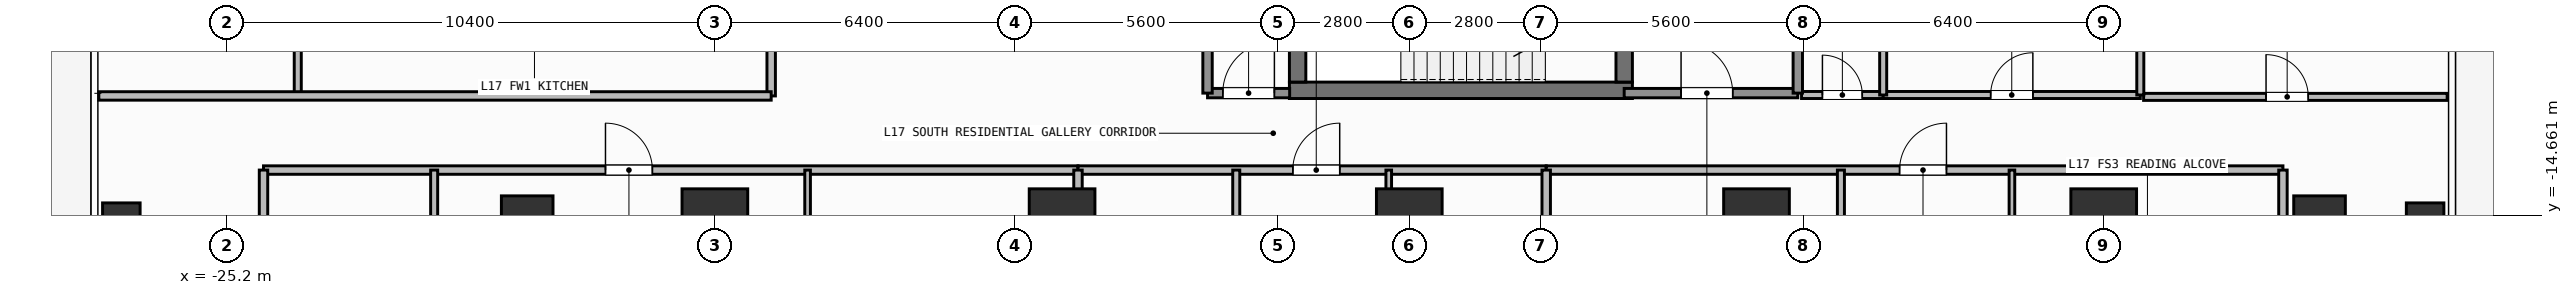
"""IFC4 building model, lengths in metres.
Left out: names, types, materials, properties, quantities, classifications, styles, units other than length and angle.
Written with IfcOpenShell. Run it as: python <this file> out.ifc"""

import sys

from ifc_helpers import new_model, si_unit, direction, frame, frame_2d, origin, origin_2d, place, context, subcontext, project, spatial, rectangle, hollow_rectangle, extrude, element, fill, save


model = new_model("IFC4")
c1 = context("Model", 3, precision=1e-05, world=origin(), true_north=direction((0.0, 1.0)))
c2 = subcontext(c1, "Body", "Model", "MODEL_VIEW")
j1 = project(units=[si_unit("LENGTHUNIT", "METRE"), si_unit("PLANEANGLEUNIT", "RADIAN")], contexts=[c1])
p1 = place(None, origin())
s1 = spatial("IfcSite", under=j1, at=p1, CompositionType="ELEMENT")
p2 = place(p1, origin())
s2 = spatial("IfcBuilding", under=s1, at=p2, CompositionType="ELEMENT")
p3 = place(p2, frame((0.0, 0.0, 65.7)))
s3 = spatial("IfcBuildingStorey", under=s2, at=p3, CompositionType="ELEMENT", Elevation=65.7)
p4 = place(p3, frame((-2.555, -12.0, 0.0), z_axis=(0.0, 0.0, 1.0), x_axis=(1.0, 0.0, 0.0)))
e1 = element("IfcWall", 1, at=p4, inside=s3, PredefinedType="SHEAR", context=c2, shape_type="SweptSolid", body=[
    extrude(rectangle(XDim=7.31, YDim=0.35, at=frame_2d((3.655, 0.0))), origin(), (0.0, 0.0, 1.0), 3.9),
])
p5 = place(p3, frame((-2.38, -11.825, 0.0), z_axis=(0.0, 0.0, 1.0), x_axis=(0.0, 1.0, 0.0)))
e2 = element("IfcWall", 2, at=p5, inside=s3, PredefinedType="SHEAR", context=c2, shape_type="SweptSolid", body=[
    extrude(rectangle(XDim=2.925, YDim=0.35, at=frame_2d((1.462, 0.0))), origin(), (0.0, 0.0, 1.0), 3.9),
])
p6 = place(p3, frame((4.58, -8.9, 0.0), z_axis=(0.0, 0.0, 1.0), x_axis=(0.0, -1.0, 0.0)))
e3 = element("IfcWall", 3, at=p6, inside=s3, PredefinedType="SHEAR", context=c2, shape_type="SweptSolid", body=[
    extrude(rectangle(XDim=2.925, YDim=0.35, at=frame_2d((1.462, 0.0))), origin(), (0.0, 0.0, 1.0), 3.9),
])
p7 = place(p6, frame((0.913, 0.0, 0.0)))
e4 = element("IfcOpeningElement", 4, at=p7, cuts=e3, PredefinedType="OPENING", context=c2, shape_type="SweptSolid", body=[
    extrude(rectangle(XDim=1.1, YDim=2.15, at=frame_2d((0.55, 1.075))), frame((0.0, 0.185, 0.0), z_axis=(0.0, -1.0, 0.0), x_axis=(1.0, 0.0, 0.0)), (0.0, 0.0, 1.0), 0.37),
])
for number, where, z_axis, x_axis in (
    (5, (-14.8, -14.8, 0.0), (0.0, 0.0, 1.0), (1.0, 0.0, 0.0)),
    (6, (-7.4, -14.8, 0.0), (0.0, 0.0, 1.0), (1.0, 0.0, 0.0)),
    (7, (0.0, -14.8, 0.0), (0.0, 0.0, 1.0), (1.0, 0.0, 0.0)),
    (8, (7.4, -14.8, 0.0), (0.0, 0.0, 1.0), (1.0, 0.0, 0.0)),
    (9, (14.8, -14.8, 0.0), (0.0, 0.0, 1.0), (1.0, 0.0, 0.0)),
):
    element("IfcColumn", number, at=place(p3, frame(where, z_axis=z_axis, x_axis=x_axis)), inside=s3, PredefinedType="COLUMN", context=c2, shape_type="SweptSolid", body=[
        extrude(rectangle(XDim=1.4, YDim=1.4, at=origin_2d()), origin(), (0.0, 0.0, 1.0), 3.9),
    ])
for number, where, z_axis, x_axis in (
    (10, (-18.8, -14.8, 0.0), (0.0, 0.0, 1.0), (1.0, 0.0, 0.0)),
    (11, (19.4, -14.8, 0.0), (0.0, 0.0, 1.0), (1.0, 0.0, 0.0)),
):
    element("IfcColumn", number, at=place(p3, frame(where, z_axis=z_axis, x_axis=x_axis)), inside=s3, PredefinedType="COLUMN", context=c2, shape_type="SweptSolid", body=[
        extrude(rectangle(XDim=1.1, YDim=1.1, at=origin_2d()), origin(), (0.0, 0.0, 1.0), 3.9),
    ])
for number, where, z_axis, x_axis in (
    (12, (-27.45, -14.8, 0.0), (0.0, 0.0, 1.0), (1.0, 0.0, 0.0)),
    (13, (21.65, -14.8, 0.0), (0.0, 0.0, 1.0), (1.0, 0.0, 0.0)),
):
    element("IfcColumn", number, at=place(p3, frame(where, z_axis=z_axis, x_axis=x_axis)), inside=s3, PredefinedType="COLUMN", context=c2, shape_type="SweptSolid", body=[
        extrude(hollow_rectangle(XDim=0.8, YDim=0.8, WallThickness=0.036, at=origin_2d()), origin(), (0.0, 0.0, 1.0), 3.9),
    ])
p8 = place(p3, frame((4.58, -12.06, 0.0), z_axis=(0.0, 0.0, 1.0), x_axis=(1.0, 0.0, 0.0)))
e14 = element("IfcWall", 14, at=p8, inside=s3, PredefinedType="SOLIDWALL", context=c2, shape_type="SweptSolid", body=[
    extrude(rectangle(XDim=3.7, YDim=0.2, at=frame_2d((1.85, 0.0))), origin(), (0.0, 0.0, 1.0), 3.68),
])
p9 = place(p8, frame((1.212, 0.0, 0.0)))
e15 = element("IfcOpeningElement", 15, at=p9, cuts=e14, PredefinedType="OPENING", context=c2, shape_type="SweptSolid", body=[
    extrude(rectangle(XDim=1.1, YDim=2.15, at=frame_2d((0.55, 1.075))), frame((0.0, 0.11, 0.0), z_axis=(0.0, -1.0, 0.0), x_axis=(1.0, 0.0, 0.0)), (0.0, 0.0, 1.0), 0.22),
])
p10 = place(p3, frame((-4.3, -12.06, 0.0), z_axis=(0.0, 0.0, 1.0), x_axis=(1.0, 0.0, 0.0)))
e16 = element("IfcWall", 16, at=p10, inside=s3, PredefinedType="SOLIDWALL", context=c2, shape_type="SweptSolid", body=[
    extrude(rectangle(XDim=1.75, YDim=0.2, at=frame_2d((0.875, 0.0))), origin(), (0.0, 0.0, 1.0), 3.68),
])
p11 = place(p10, frame((0.325, 0.0, 0.0)))
e17 = element("IfcOpeningElement", 17, at=p11, cuts=e16, PredefinedType="OPENING", context=c2, shape_type="SweptSolid", body=[
    extrude(rectangle(XDim=1.1, YDim=2.15, at=frame_2d((0.55, 1.075))), frame((0.0, 0.11, 0.0), z_axis=(0.0, -1.0, 0.0), x_axis=(1.0, 0.0, 0.0)), (0.0, 0.0, 1.0), 0.22),
])
p12 = place(p3, frame((8.36, -12.1, 0.0), z_axis=(0.0, 0.0, 1.0), x_axis=(1.0, 0.0, 0.0)))
e18 = element("IfcWall", 18, at=p12, inside=s3, PredefinedType="PARTITIONING", context=c2, shape_type="SweptSolid", body=[
    extrude(rectangle(XDim=1.74, YDim=0.15, at=frame_2d((0.87, 0.0))), origin(), (0.0, 0.0, 1.0), 3.68),
])
p13 = place(p12, frame((0.445, 0.0, 0.0)))
e19 = element("IfcOpeningElement", 19, at=p13, cuts=e18, PredefinedType="OPENING", context=c2, shape_type="SweptSolid", body=[
    extrude(rectangle(XDim=0.85, YDim=2.1, at=frame_2d((0.425, 1.05))), frame((0.0, 0.085, 0.0), z_axis=(0.0, -1.0, 0.0), x_axis=(1.0, 0.0, 0.0)), (0.0, 0.0, 1.0), 0.17),
])
p14 = place(p3, frame((10.1, -12.1, 0.0), z_axis=(0.0, 0.0, 1.0), x_axis=(1.0, 0.0, 0.0)))
e20 = element("IfcWall", 20, at=p14, inside=s3, PredefinedType="PARTITIONING", context=c2, shape_type="SweptSolid", body=[
    extrude(rectangle(XDim=5.48, YDim=0.15, at=frame_2d((2.74, 0.0))), origin(), (0.0, 0.0, 1.0), 3.68),
])
p15 = place(p14, frame((2.29, 0.0, 0.0)))
e21 = element("IfcOpeningElement", 21, at=p15, cuts=e20, PredefinedType="OPENING", context=c2, shape_type="SweptSolid", body=[
    extrude(rectangle(XDim=0.9, YDim=2.1, at=frame_2d((0.45, 1.05))), frame((0.0, 0.085, 0.0), z_axis=(0.0, -1.0, 0.0), x_axis=(1.0, 0.0, 0.0)), (0.0, 0.0, 1.0), 0.17),
])
p16 = place(p3, frame((-24.42, -13.7, 0.0), z_axis=(0.0, 0.0, 1.0), x_axis=(1.0, 0.0, 0.0)))
e22 = element("IfcWall", 22, at=p16, inside=s3, PredefinedType="PARTITIONING", context=c2, shape_type="SweptSolid", body=[
    extrude(rectangle(XDim=17.359, YDim=0.18, at=frame_2d((8.679, 0.0))), origin(), (0.0, 0.0, 1.0), 3.68),
])
p17 = place(p16, frame((7.288, 0.0, 0.0)))
e23 = element("IfcOpeningElement", 23, at=p17, cuts=e22, PredefinedType="OPENING", context=c2, shape_type="SweptSolid", body=[
    extrude(rectangle(XDim=1.0, YDim=2.2, at=frame_2d((0.5, 1.1))), frame((0.0, 0.1, 0.0), z_axis=(0.0, -1.0, 0.0), x_axis=(1.0, 0.0, 0.0)), (0.0, 0.0, 1.0), 0.2),
])
p18 = place(p3, frame((-20.783, -20.79, 0.0), z_axis=(0.0, 0.0, 1.0), x_axis=(0.0, 1.0, 0.0)))
e24 = element("IfcWall", 24, at=p18, inside=s3, PredefinedType="PARTITIONING", context=c2, shape_type="SweptSolid", body=[
    extrude(rectangle(XDim=7.09, YDim=0.15, at=frame_2d((3.545, 0.0))), origin(), (0.0, 0.0, 1.0), 3.68),
])
p19 = place(p18, frame((3.03, 0.0, 0.0)))
e25 = element("IfcOpeningElement", 25, at=p19, cuts=e24, PredefinedType="OPENING", context=c2, shape_type="SweptSolid", body=[
    extrude(rectangle(XDim=0.85, YDim=2.1, at=frame_2d((0.425, 1.05))), frame((0.0, 0.085, 0.0), z_axis=(0.0, -1.0, 0.0), x_axis=(1.0, 0.0, 0.0)), (0.0, 0.0, 1.0), 0.17),
])
p20 = place(p3, frame((-12.824, -18.663, 0.0), z_axis=(0.0, 0.0, 1.0), x_axis=(0.0, 1.0, 0.0)))
e26 = element("IfcWall", 26, at=p20, inside=s3, PredefinedType="PARTITIONING", context=c2, shape_type="SweptSolid", body=[
    extrude(rectangle(XDim=4.963, YDim=0.12, at=frame_2d((2.481, 0.0))), origin(), (0.0, 0.0, 1.0), 3.68),
])
p21 = place(p20, frame((2.229, 0.0, 0.0)))
e27 = element("IfcOpeningElement", 27, at=p21, cuts=e26, PredefinedType="OPENING", context=c2, shape_type="SweptSolid", body=[
    extrude(rectangle(XDim=0.85, YDim=2.1, at=frame_2d((0.425, 1.05))), frame((0.0, 0.07, 0.0), z_axis=(0.0, -1.0, 0.0), x_axis=(1.0, 0.0, 0.0)), (0.0, 0.0, 1.0), 0.14),
])
p22 = place(p3, frame((-7.061, -13.7, 0.0), z_axis=(0.0, 0.0, 1.0), x_axis=(1.0, 0.0, 0.0)))
e28 = element("IfcWall", 28, at=p22, inside=s3, PredefinedType="PARTITIONING", context=c2, shape_type="SweptSolid", body=[
    extrude(rectangle(XDim=9.979, YDim=0.18, at=frame_2d((4.99, 0.0))), origin(), (0.0, 0.0, 1.0), 3.68),
])
p23 = place(p22, frame((4.578, 0.0, 0.0)))
e29 = element("IfcOpeningElement", 29, at=p23, cuts=e28, PredefinedType="OPENING", context=c2, shape_type="SweptSolid", body=[
    extrude(rectangle(XDim=1.0, YDim=2.2, at=frame_2d((0.5, 1.1))), frame((0.0, 0.1, 0.0), z_axis=(0.0, -1.0, 0.0), x_axis=(1.0, 0.0, 0.0)), (0.0, 0.0, 1.0), 0.2),
])
p24 = place(p3, frame((-3.688, -20.79, 0.0), z_axis=(0.0, 0.0, 1.0), x_axis=(0.0, 1.0, 0.0)))
e30 = element("IfcWall", 30, at=p24, inside=s3, PredefinedType="PARTITIONING", context=c2, shape_type="SweptSolid", body=[
    extrude(rectangle(XDim=7.09, YDim=0.15, at=frame_2d((3.545, 0.0))), origin(), (0.0, 0.0, 1.0), 3.68),
])
p25 = place(p24, frame((3.03, 0.0, 0.0)))
e31 = element("IfcOpeningElement", 31, at=p25, cuts=e30, PredefinedType="OPENING", context=c2, shape_type="SweptSolid", body=[
    extrude(rectangle(XDim=0.85, YDim=2.1, at=frame_2d((0.425, 1.05))), frame((0.0, 0.085, 0.0), z_axis=(0.0, -1.0, 0.0), x_axis=(1.0, 0.0, 0.0)), (0.0, 0.0, 1.0), 0.17),
])
p26 = place(p3, frame((-0.438, -18.082, 0.0), z_axis=(0.0, 0.0, 1.0), x_axis=(0.0, 1.0, 0.0)))
e32 = element("IfcWall", 32, at=p26, inside=s3, PredefinedType="PARTITIONING", context=c2, shape_type="SweptSolid", body=[
    extrude(rectangle(XDim=4.382, YDim=0.12, at=frame_2d((2.191, 0.0))), origin(), (0.0, 0.0, 1.0), 3.68),
])
p27 = place(p26, frame((1.588, 0.0, 0.0)))
e33 = element("IfcOpeningElement", 33, at=p27, cuts=e32, PredefinedType="OPENING", context=c2, shape_type="SweptSolid", body=[
    extrude(rectangle(XDim=0.85, YDim=2.1, at=frame_2d((0.425, 1.05))), frame((0.0, 0.07, 0.0), z_axis=(0.0, -1.0, 0.0), x_axis=(1.0, 0.0, 0.0)), (0.0, 0.0, 1.0), 0.14),
])
p28 = place(p3, frame((2.918, -13.7, 0.0), z_axis=(0.0, 0.0, 1.0), x_axis=(1.0, 0.0, 0.0)))
e34 = element("IfcWall", 34, at=p28, inside=s3, PredefinedType="PARTITIONING", context=c2, shape_type="SweptSolid", body=[
    extrude(rectangle(XDim=15.702, YDim=0.18, at=frame_2d((7.851, 0.0))), origin(), (0.0, 0.0, 1.0), 3.68),
])
p29 = place(p28, frame((7.531, 0.0, 0.0)))
e35 = element("IfcOpeningElement", 35, at=p29, cuts=e34, PredefinedType="OPENING", context=c2, shape_type="SweptSolid", body=[
    extrude(rectangle(XDim=1.0, YDim=2.2, at=frame_2d((0.5, 1.1))), frame((0.0, 0.1, 0.0), z_axis=(0.0, -1.0, 0.0), x_axis=(1.0, 0.0, 0.0)), (0.0, 0.0, 1.0), 0.2),
])
p30 = place(p3, frame((9.199, -20.79, 0.0), z_axis=(0.0, 0.0, 1.0), x_axis=(0.0, 1.0, 0.0)))
e36 = element("IfcWall", 36, at=p30, inside=s3, PredefinedType="PARTITIONING", context=c2, shape_type="SweptSolid", body=[
    extrude(rectangle(XDim=7.09, YDim=0.15, at=frame_2d((3.545, 0.0))), origin(), (0.0, 0.0, 1.0), 3.68),
])
p31 = place(p30, frame((2.133, 0.0, 0.0)))
e37 = element("IfcOpeningElement", 37, at=p31, cuts=e36, PredefinedType="OPENING", context=c2, shape_type="SweptSolid", body=[
    extrude(rectangle(XDim=0.85, YDim=2.1, at=frame_2d((0.425, 1.05))), frame((0.0, 0.085, 0.0), z_axis=(0.0, -1.0, 0.0), x_axis=(1.0, 0.0, 0.0)), (0.0, 0.0, 1.0), 0.17),
])
p32 = place(p3, frame((12.844, -17.1, 0.0), z_axis=(0.0, 0.0, 1.0), x_axis=(0.0, 1.0, 0.0)))
e38 = element("IfcWall", 38, at=p32, inside=s3, PredefinedType="PARTITIONING", context=c2, shape_type="SweptSolid", body=[
    extrude(rectangle(XDim=3.4, YDim=0.12, at=frame_2d((1.7, 0.0))), origin(), (0.0, 0.0, 1.0), 3.68),
])
p33 = place(p32, frame((0.675, 0.0, 0.0)))
e39 = element("IfcOpeningElement", 39, at=p33, cuts=e38, PredefinedType="OPENING", context=c2, shape_type="SweptSolid", body=[
    extrude(rectangle(XDim=0.85, YDim=2.1, at=frame_2d((0.425, 1.05))), frame((0.0, 0.07, 0.0), z_axis=(0.0, -1.0, 0.0), x_axis=(1.0, 0.0, 0.0)), (0.0, 0.0, 1.0), 0.14),
])
p34 = place(p3, frame((-13.6, -12.12, 0.0), z_axis=(0.0, 0.0, 1.0), x_axis=(0.0, 1.0, 0.0)))
e40 = element("IfcWall", 40, at=p34, inside=s3, PredefinedType="PARTITIONING", context=c2, shape_type="SweptSolid", body=[
    extrude(rectangle(XDim=11.247, YDim=0.18, at=frame_2d((5.624, 0.0))), origin(), (0.0, 0.0, 1.0), 3.68),
])
p35 = place(p34, frame((5.478, 0.0, 0.0)))
e41 = element("IfcOpeningElement", 41, at=p35, cuts=e40, PredefinedType="OPENING", context=c2, shape_type="SweptSolid", body=[
    extrude(rectangle(XDim=1.0, YDim=2.2, at=frame_2d((0.5, 1.1))), frame((0.0, 0.1, 0.0), z_axis=(0.0, -1.0, 0.0), x_axis=(1.0, 0.0, 0.0)), (0.0, 0.0, 1.0), 0.2),
])
p36 = place(p3, frame((15.65, -12.14, 0.0), z_axis=(0.0, 0.0, 1.0), x_axis=(1.0, 0.0, 0.0)))
e42 = element("IfcWall", 42, at=p36, inside=s3, PredefinedType="PARTITIONING", context=c2, shape_type="SweptSolid", body=[
    extrude(rectangle(XDim=6.47, YDim=0.15, at=frame_2d((3.235, 0.0))), origin(), (0.0, 0.0, 1.0), 3.68),
])
p37 = place(p36, frame((2.61, 0.0, 0.0)))
e43 = element("IfcOpeningElement", 43, at=p37, cuts=e42, PredefinedType="OPENING", context=c2, shape_type="SweptSolid", body=[
    extrude(rectangle(XDim=0.9, YDim=2.1, at=frame_2d((0.45, 1.05))), frame((0.0, 0.085, 0.0), z_axis=(0.0, -1.0, 0.0), x_axis=(1.0, 0.0, 0.0)), (0.0, 0.0, 1.0), 0.17),
])
for number, where, z_axis, x_axis in (
    (44, (8.28, -12.06, 0.0), (0.0, 0.0, 1.0), (0.0, 1.0, 0.0)),
    (45, (-4.3, -12.06, 0.0), (0.0, 0.0, 1.0), (0.0, 1.0, 0.0)),
):
    element("IfcWall", number, at=place(p3, frame(where, z_axis=z_axis, x_axis=x_axis)), inside=s3, PredefinedType="SOLIDWALL", context=c2, shape_type="SweptSolid", body=[
        extrude(rectangle(XDim=3.11, YDim=0.2, at=frame_2d((1.555, 0.0))), origin(), (0.0, 0.0, 1.0), 3.68),
    ])
p38 = place(p3, frame((10.1, -12.1, 0.0), z_axis=(0.0, 0.0, 1.0), x_axis=(0.0, 1.0, 0.0)))
e46 = element("IfcWall", 46, at=p38, inside=s3, PredefinedType="PARTITIONING", context=c2, shape_type="SweptSolid", body=[
    extrude(rectangle(XDim=2.35, YDim=0.15, at=frame_2d((1.175, 0.0))), origin(), (0.0, 0.0, 1.0), 3.68),
])
p39 = place(p3, frame((15.58, -12.1, 0.0), z_axis=(0.0, 0.0, 1.0), x_axis=(0.0, 1.0, 0.0)))
e47 = element("IfcWall", 47, at=p39, inside=s3, PredefinedType="PARTITIONING", context=c2, shape_type="SweptSolid", body=[
    extrude(rectangle(XDim=6.25, YDim=0.15, at=frame_2d((3.125, 0.0))), origin(), (0.0, 0.0, 1.0), 3.68),
])
for number, where, z_axis, x_axis in (
    (48, (-24.42, -23.91, 0.0), (0.0, 0.0, 1.0), (0.0, 1.0, 0.0)),
    (49, (18.62, -23.91, 0.0), (0.0, 0.0, 1.0), (0.0, 1.0, 0.0)),
):
    element("IfcWall", number, at=place(p3, frame(where, z_axis=z_axis, x_axis=x_axis)), inside=s3, PredefinedType="PARTITIONING", context=c2, shape_type="SweptSolid", body=[
        extrude(rectangle(XDim=10.21, YDim=0.18, at=frame_2d((5.105, 0.0))), origin(), (0.0, 0.0, 1.0), 3.68),
    ])
for number, where, z_axis, x_axis in (
    (50, (-7.061, -25.03, 0.0), (0.0, 0.0, 1.0), (0.0, 1.0, 0.0)),
    (51, (2.918, -25.03, 0.0), (0.0, 0.0, 1.0), (0.0, 1.0, 0.0)),
):
    element("IfcWall", number, at=place(p3, frame(where, z_axis=z_axis, x_axis=x_axis)), inside=s3, PredefinedType="PARTITIONING", context=c2, shape_type="SweptSolid", body=[
        extrude(rectangle(XDim=11.33, YDim=0.18, at=frame_2d((5.665, 0.0))), origin(), (0.0, 0.0, 1.0), 3.68),
    ])
p40 = place(p3, frame((-23.69, -12.12, 0.0), z_axis=(0.0, 0.0, 1.0), x_axis=(0.0, 1.0, 0.0)))
e52 = element("IfcWall", 52, at=p40, inside=s3, PredefinedType="PARTITIONING", context=c2, shape_type="SweptSolid", body=[
    extrude(rectangle(XDim=2.8, YDim=0.15, at=frame_2d((1.4, 0.0))), origin(), (0.0, 0.0, 1.0), 3.68),
])
p41 = place(p3, frame((-27.93, -12.12, 0.0), z_axis=(0.0, 0.0, 1.0), x_axis=(1.0, 0.0, 0.0)))
e53 = element("IfcWall", 53, at=p41, inside=s3, PredefinedType="PARTITIONING", context=c2, shape_type="SweptSolid", body=[
    extrude(rectangle(XDim=14.33, YDim=0.18, at=frame_2d((7.165, 0.0))), origin(), (0.0, 0.0, 1.0), 3.68),
])
p42 = place(p9, origin())
e54 = element("IfcDoor", 54, at=p42, inside=s3, OperationType="SINGLE_SWING_LEFT", PredefinedType="DOOR", context=c2, shape_type="SweptSolid", body=[
    extrude(rectangle(XDim=1.1, YDim=2.15, at=frame_2d((0.55, 1.075))), frame((0.0, 0.025, 0.0), z_axis=(0.0, -1.0, 0.0), x_axis=(1.0, 0.0, 0.0)), (0.0, 0.0, 1.0), 0.05),
])
fill(e15, e54)
p43 = place(p11, origin())
e55 = element("IfcDoor", 55, at=p43, inside=s3, OperationType="SINGLE_SWING_RIGHT", PredefinedType="DOOR", context=c2, shape_type="SweptSolid", body=[
    extrude(rectangle(XDim=1.1, YDim=2.15, at=frame_2d((0.55, 1.075))), frame((0.0, 0.025, 0.0), z_axis=(0.0, -1.0, 0.0), x_axis=(1.0, 0.0, 0.0)), (0.0, 0.0, 1.0), 0.05),
])
fill(e17, e55)
p44 = place(p13, origin())
e56 = element("IfcDoor", 56, at=p44, inside=s3, OperationType="SINGLE_SWING_LEFT", PredefinedType="DOOR", context=c2, shape_type="SweptSolid", body=[
    extrude(rectangle(XDim=0.85, YDim=2.1, at=frame_2d((0.425, 1.05))), frame((0.0, 0.025, 0.0), z_axis=(0.0, -1.0, 0.0), x_axis=(1.0, 0.0, 0.0)), (0.0, 0.0, 1.0), 0.05),
])
fill(e19, e56)
p45 = place(p15, origin())
e57 = element("IfcDoor", 57, at=p45, inside=s3, OperationType="SINGLE_SWING_RIGHT", PredefinedType="DOOR", context=c2, shape_type="SweptSolid", body=[
    extrude(rectangle(XDim=0.9, YDim=2.1, at=frame_2d((0.45, 1.05))), frame((0.0, 0.025, 0.0), z_axis=(0.0, -1.0, 0.0), x_axis=(1.0, 0.0, 0.0)), (0.0, 0.0, 1.0), 0.05),
])
fill(e21, e57)
p46 = place(p17, origin())
e58 = element("IfcDoor", 58, at=p46, inside=s3, OperationType="SINGLE_SWING_LEFT", PredefinedType="DOOR", context=c2, shape_type="SweptSolid", body=[
    extrude(rectangle(XDim=1.0, YDim=2.2, at=frame_2d((0.5, 1.1))), frame((0.0, 0.025, 0.0), z_axis=(0.0, -1.0, 0.0), x_axis=(1.0, 0.0, 0.0)), (0.0, 0.0, 1.0), 0.05),
])
fill(e23, e58)
p47 = place(p23, origin())
e59 = element("IfcDoor", 59, at=p47, inside=s3, OperationType="SINGLE_SWING_RIGHT", PredefinedType="DOOR", context=c2, shape_type="SweptSolid", body=[
    extrude(rectangle(XDim=1.0, YDim=2.2, at=frame_2d((0.5, 1.1))), frame((0.0, 0.025, 0.0), z_axis=(0.0, -1.0, 0.0), x_axis=(1.0, 0.0, 0.0)), (0.0, 0.0, 1.0), 0.05),
])
fill(e29, e59)
p48 = place(p29, origin())
e60 = element("IfcDoor", 60, at=p48, inside=s3, OperationType="SINGLE_SWING_RIGHT", PredefinedType="DOOR", context=c2, shape_type="SweptSolid", body=[
    extrude(rectangle(XDim=1.0, YDim=2.2, at=frame_2d((0.5, 1.1))), frame((0.0, 0.025, 0.0), z_axis=(0.0, -1.0, 0.0), x_axis=(1.0, 0.0, 0.0)), (0.0, 0.0, 1.0), 0.05),
])
fill(e35, e60)
p49 = place(p37, origin())
e61 = element("IfcDoor", 61, at=p49, inside=s3, OperationType="SINGLE_SWING_LEFT", PredefinedType="DOOR", context=c2, shape_type="SweptSolid", body=[
    extrude(rectangle(XDim=0.9, YDim=2.1, at=frame_2d((0.45, 1.05))), frame((0.0, 0.025, 0.0), z_axis=(0.0, -1.0, 0.0), x_axis=(1.0, 0.0, 0.0)), (0.0, 0.0, 1.0), 0.05),
])
fill(e43, e61)
save(model, sys.argv[1])
